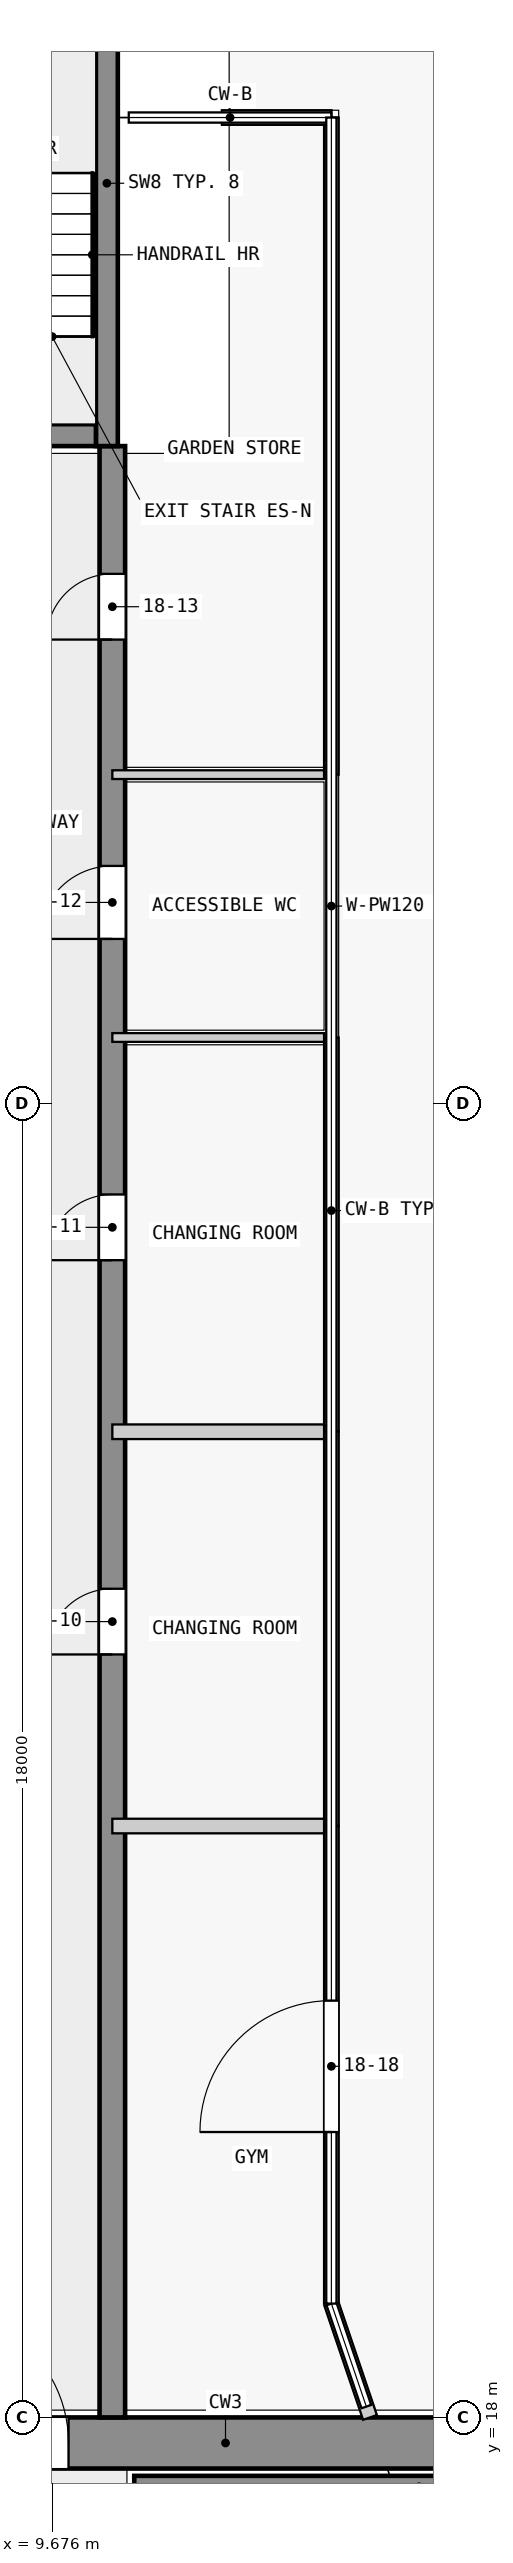
"""IFC4 building model, lengths in metres.
Left out: names, types, materials, properties, quantities, classifications, styles, units other than length and angle.
Written with IfcOpenShell. Run it as: python <this file> out.ifc"""

import sys

from ifc_helpers import new_model, si_unit, direction, frame, frame_2d, origin, place, context, subcontext, project, spatial, rectangle, extrude, element, fill, save


model = new_model("IFC4")
c1 = context("Model", 3, precision=1e-05, world=origin(), true_north=direction((0.0, 1.0)))
c2 = subcontext(c1, "Body", "Model", "MODEL_VIEW")
j1 = project(units=[si_unit("LENGTHUNIT", "METRE"), si_unit("PLANEANGLEUNIT", "RADIAN")], contexts=[c1])
p1 = place(None, origin())
s1 = spatial("IfcSite", under=j1, at=p1, CompositionType="ELEMENT")
p2 = place(p1, origin())
s2 = spatial("IfcBuilding", under=s1, at=p2, CompositionType="ELEMENT")
p3 = place(p2, frame((0.0, 0.0, 72.3)))
s3 = spatial("IfcBuildingStorey", under=s2, at=p3, CompositionType="ELEMENT", Elevation=72.3)
p4 = place(p3, frame((1.6, 17.65, 0.0), z_axis=(0.0, 0.0, 1.0), x_axis=(1.0, 0.0, 0.0)))
e1 = element("IfcWall", 1, at=p4, inside=s3, PredefinedType="SHEAR", context=c2, shape_type="SweptSolid", body=[
    extrude(rectangle(XDim=20.9, YDim=0.7, at=frame_2d((10.45, 0.0))), origin(), (0.0, 0.0, 1.0), 5.75),
])
p5 = place(p4, frame((6.5, 0.0, 0.0)))
e2 = element("IfcOpeningElement", 2, at=p5, cuts=e1, PredefinedType="OPENING", context=c2, shape_type="SweptSolid", body=[
    extrude(rectangle(XDim=1.8, YDim=2.1, at=frame_2d((0.9, 1.05))), frame((0.0, 0.36, 0.0), z_axis=(0.0, -1.0, 0.0), x_axis=(1.0, 0.0, 0.0)), (0.0, 0.0, 1.0), 0.72),
])
p6 = place(p3, frame((10.8, 17.05, 0.0), z_axis=(0.0, 0.0, 1.0), x_axis=(1.0, 0.0, 0.0)))
e3 = element("IfcWall", 3, at=p6, inside=s3, PredefinedType="SHEAR", context=c2, shape_type="SweptSolid", body=[
    extrude(rectangle(XDim=7.8, YDim=0.3, at=frame_2d((3.9, 0.0))), origin(), (0.0, 0.0, 1.0), 5.75),
])
p7 = place(p3, frame((7.725, 45.15, 0.0), z_axis=(0.0, 0.0, 1.0), x_axis=(1.0, 0.0, 0.0)))
e4 = element("IfcWall", 4, at=p7, inside=s3, PredefinedType="SHEAR", context=c2, shape_type="SweptSolid", body=[
    extrude(rectangle(XDim=2.55, YDim=0.3, at=frame_2d((1.275, 0.0))), origin(), (0.0, 0.0, 1.0), 6.0),
])
p8 = place(p7, frame((0.725, 0.0, 0.0)))
e5 = element("IfcOpeningElement", 5, at=p8, cuts=e4, PredefinedType="OPENING", context=c2, shape_type="SweptSolid", body=[
    extrude(rectangle(XDim=1.1, YDim=2.1, at=frame_2d((0.55, 1.05))), frame((0.0, 0.16, 0.0), z_axis=(0.0, -1.0, 0.0), x_axis=(1.0, 0.0, 0.0)), (0.0, 0.0, 1.0), 0.32),
])
p9 = place(p3, frame((10.425, 45.0, 0.0), z_axis=(0.0, 0.0, 1.0), x_axis=(0.0, 1.0, 0.0)))
e6 = element("IfcWall", 6, at=p9, inside=s3, PredefinedType="SHEAR", context=c2, shape_type="SweptSolid", body=[
    extrude(rectangle(XDim=7.2, YDim=0.3, at=frame_2d((3.6, 0.0))), origin(), (0.0, 0.0, 1.0), 6.0),
])
p10 = place(p3, frame((10.5, 18.0, 0.0), z_axis=(0.0, 0.0, 1.0), x_axis=(0.0, 1.0, 0.0)))
e7 = element("IfcWall", 7, at=p10, inside=s3, PredefinedType="SHEAR", context=c2, shape_type="SweptSolid", body=[
    extrude(rectangle(XDim=27.0, YDim=0.35, at=frame_2d((13.5, 0.0))), origin(), (0.0, 0.0, 1.0), 5.75),
])
p11 = place(p10, frame((10.45, 0.0, 0.0)))
e8 = element("IfcOpeningElement", 8, at=p11, cuts=e7, PredefinedType="OPENING", context=c2, shape_type="SweptSolid", body=[
    extrude(rectangle(XDim=0.9, YDim=2.1, at=frame_2d((0.45, 1.05))), frame((0.0, 0.185, 0.0), z_axis=(0.0, -1.0, 0.0), x_axis=(1.0, 0.0, 0.0)), (0.0, 0.0, 1.0), 0.37),
])
p12 = place(p10, frame((15.85, 0.0, 0.0)))
e9 = element("IfcOpeningElement", 9, at=p12, cuts=e7, PredefinedType="OPENING", context=c2, shape_type="SweptSolid", body=[
    extrude(rectangle(XDim=0.9, YDim=2.1, at=frame_2d((0.45, 1.05))), frame((0.0, 0.185, 0.0), z_axis=(0.0, -1.0, 0.0), x_axis=(1.0, 0.0, 0.0)), (0.0, 0.0, 1.0), 0.37),
])
p13 = place(p10, frame((20.25, 0.0, 0.0)))
e10 = element("IfcOpeningElement", 10, at=p13, cuts=e7, PredefinedType="OPENING", context=c2, shape_type="SweptSolid", body=[
    extrude(rectangle(XDim=1.0, YDim=2.1, at=frame_2d((0.5, 1.05))), frame((0.0, 0.185, 0.0), z_axis=(0.0, -1.0, 0.0), x_axis=(1.0, 0.0, 0.0)), (0.0, 0.0, 1.0), 0.37),
])
p14 = place(p10, frame((24.35, 0.0, 0.0)))
e11 = element("IfcOpeningElement", 11, at=p14, cuts=e7, PredefinedType="OPENING", context=c2, shape_type="SweptSolid", body=[
    extrude(rectangle(XDim=0.9, YDim=2.1, at=frame_2d((0.45, 1.05))), frame((0.0, 0.185, 0.0), z_axis=(0.0, -1.0, 0.0), x_axis=(1.0, 0.0, 0.0)), (0.0, 0.0, 1.0), 0.37),
])
p15 = place(p3, frame((13.5, 40.5, 0.0), z_axis=(0.0, 0.0, 1.0), x_axis=(0.0, 1.0, 0.0)))
e12 = element("IfcWall", 12, at=p15, inside=s3, PredefinedType="PARTITIONING", context=c2, shape_type="SweptSolid", body=[
    extrude(rectangle(XDim=9.0, YDim=0.2, at=frame_2d((4.5, 0.0))), origin(), (0.0, 0.0, 1.0), 5.75),
])
p16 = place(p3, frame((13.5, 49.5, 0.0), z_axis=(0.0, 0.0, 1.0), x_axis=(-1.0, 0.0, 0.0)))
e13 = element("IfcWall", 13, at=p16, inside=s3, PredefinedType="PARTITIONING", context=c2, shape_type="SweptSolid", body=[
    extrude(rectangle(XDim=1.5, YDim=0.2, at=frame_2d((0.75, 0.0))), origin(), (0.0, 0.0, 1.0), 5.75),
])
p17 = place(p3, frame((14.029, 18.0, 0.0), z_axis=(0.0, 0.0, 1.0), x_axis=(-0.32133908787, 0.946964197109, 0.0)))
e14 = element("IfcWall", 14, at=p17, inside=s3, PredefinedType="PARTITIONING", context=c2, shape_type="SweptSolid", body=[
    extrude(rectangle(XDim=1.646, YDim=0.2, at=frame_2d((0.823, 0.0))), origin(), (0.0, 0.0, 1.0), 5.75),
])
p18 = place(p3, frame((13.5, 19.559, 0.0), z_axis=(0.0, 0.0, 1.0), x_axis=(0.0, 1.0, 0.0)))
e15 = element("IfcWall", 15, at=p18, inside=s3, PredefinedType="PARTITIONING", context=c2, shape_type="SweptSolid", body=[
    extrude(rectangle(XDim=6.541, YDim=0.2, at=frame_2d((3.271, 0.0))), origin(), (0.0, 0.0, 1.0), 5.75),
])
p19 = place(p18, frame((2.35, 0.0, 0.0)))
e16 = element("IfcOpeningElement", 16, at=p19, cuts=e15, PredefinedType="OPENING", context=c2, shape_type="SweptSolid", body=[
    extrude(rectangle(XDim=1.8, YDim=2.1, at=frame_2d((0.9, 1.05))), frame((0.0, 0.11, 0.0), z_axis=(0.0, -1.0, 0.0), x_axis=(1.0, 0.0, 0.0)), (0.0, 0.0, 1.0), 0.22),
])
for number, where, z_axis, x_axis in (
    (17, (13.5, 31.5, 0.0), (0.0, 0.0, 1.0), (0.0, 1.0, 0.0)),
    (18, (13.5, 26.1, 0.0), (0.0, 0.0, 1.0), (0.0, 1.0, 0.0)),
):
    element("IfcWall", number, at=place(p3, frame(where, z_axis=z_axis, x_axis=x_axis)), inside=s3, PredefinedType="PARTITIONING", context=c2, shape_type="SweptSolid", body=[
        extrude(rectangle(XDim=5.4, YDim=0.2, at=frame_2d((2.7, 0.0))), origin(), (0.0, 0.0, 1.0), 5.75),
    ])
p20 = place(p3, frame((13.5, 36.9, 0.0), z_axis=(0.0, 0.0, 1.0), x_axis=(0.0, 1.0, 0.0)))
e19 = element("IfcWall", 19, at=p20, inside=s3, PredefinedType="PARTITIONING", context=c2, shape_type="SweptSolid", body=[
    extrude(rectangle(XDim=3.6, YDim=0.12, at=frame_2d((1.8, 0.0))), origin(), (0.0, 0.0, 1.0), 5.75),
])
p21 = place(p3, frame((10.5, 36.9, 0.0), z_axis=(0.0, 0.0, 1.0), x_axis=(1.0, 0.0, 0.0)))
e20 = element("IfcWall", 20, at=p21, inside=s3, PredefinedType="PARTITIONING", context=c2, shape_type="SweptSolid", body=[
    extrude(rectangle(XDim=2.9, YDim=0.12, at=frame_2d((1.45, 0.0))), origin(), (0.0, 0.0, 1.0), 5.75),
])
for number, where, z_axis, x_axis in (
    (21, (10.5, 26.1, 0.0), (0.0, 0.0, 1.0), (1.0, 0.0, 0.0)),
    (22, (10.5, 31.5, 0.0), (0.0, 0.0, 1.0), (1.0, 0.0, 0.0)),
):
    element("IfcWall", number, at=place(p3, frame(where, z_axis=z_axis, x_axis=x_axis)), inside=s3, PredefinedType="PARTITIONING", context=c2, shape_type="SweptSolid", body=[
        extrude(rectangle(XDim=2.9, YDim=0.2, at=frame_2d((1.45, 0.0))), origin(), (0.0, 0.0, 1.0), 5.75),
    ])
p22 = place(p3, frame((10.5, 40.5, 0.0), z_axis=(0.0, 0.0, 1.0), x_axis=(1.0, 0.0, 0.0)))
e23 = element("IfcWall", 23, at=p22, inside=s3, PredefinedType="PARTITIONING", context=c2, shape_type="SweptSolid", body=[
    extrude(rectangle(XDim=2.9, YDim=0.12, at=frame_2d((1.45, 0.0))), origin(), (0.0, 0.0, 1.0), 5.75),
])
p23 = place(p5, origin())
e24 = element("IfcDoor", 24, at=p23, inside=s3, OperationType="DOUBLE_DOOR_SINGLE_SWING", PredefinedType="DOOR", context=c2, shape_type="SweptSolid", body=[
    extrude(rectangle(XDim=1.8, YDim=2.1, at=frame_2d((0.9, 1.05))), frame((0.0, 0.025, 0.0), z_axis=(0.0, -1.0, 0.0), x_axis=(1.0, 0.0, 0.0)), (0.0, 0.0, 1.0), 0.05),
])
fill(e2, e24)
p24 = place(p11, origin())
e25 = element("IfcDoor", 25, at=p24, inside=s3, OperationType="SINGLE_SWING_LEFT", PredefinedType="DOOR", context=c2, shape_type="SweptSolid", body=[
    extrude(rectangle(XDim=0.9, YDim=2.1, at=frame_2d((0.45, 1.05))), frame((0.0, 0.025, 0.0), z_axis=(0.0, -1.0, 0.0), x_axis=(1.0, 0.0, 0.0)), (0.0, 0.0, 1.0), 0.05),
])
fill(e8, e25)
p25 = place(p12, origin())
e26 = element("IfcDoor", 26, at=p25, inside=s3, OperationType="SINGLE_SWING_RIGHT", PredefinedType="DOOR", context=c2, shape_type="SweptSolid", body=[
    extrude(rectangle(XDim=0.9, YDim=2.1, at=frame_2d((0.45, 1.05))), frame((0.0, 0.025, 0.0), z_axis=(0.0, -1.0, 0.0), x_axis=(1.0, 0.0, 0.0)), (0.0, 0.0, 1.0), 0.05),
])
fill(e9, e26)
p26 = place(p13, origin())
e27 = element("IfcDoor", 27, at=p26, inside=s3, OperationType="SINGLE_SWING_RIGHT", PredefinedType="DOOR", context=c2, shape_type="SweptSolid", body=[
    extrude(rectangle(XDim=1.0, YDim=2.1, at=frame_2d((0.5, 1.05))), frame((0.0, 0.025, 0.0), z_axis=(0.0, -1.0, 0.0), x_axis=(1.0, 0.0, 0.0)), (0.0, 0.0, 1.0), 0.05),
])
fill(e10, e27)
p27 = place(p14, origin())
e28 = element("IfcDoor", 28, at=p27, inside=s3, OperationType="SINGLE_SWING_RIGHT", PredefinedType="DOOR", context=c2, shape_type="SweptSolid", body=[
    extrude(rectangle(XDim=0.9, YDim=2.1, at=frame_2d((0.45, 1.05))), frame((0.0, 0.025, 0.0), z_axis=(0.0, -1.0, 0.0), x_axis=(1.0, 0.0, 0.0)), (0.0, 0.0, 1.0), 0.05),
])
fill(e11, e28)
p28 = place(p19, origin())
e29 = element("IfcDoor", 29, at=p28, inside=s3, OperationType="DOUBLE_DOOR_SINGLE_SWING", PredefinedType="DOOR", context=c2, shape_type="SweptSolid", body=[
    extrude(rectangle(XDim=1.8, YDim=2.1, at=frame_2d((0.9, 1.05))), frame((0.0, 0.025, 0.0), z_axis=(0.0, -1.0, 0.0), x_axis=(1.0, 0.0, 0.0)), (0.0, 0.0, 1.0), 0.05),
])
fill(e16, e29)
save(model, sys.argv[1])
